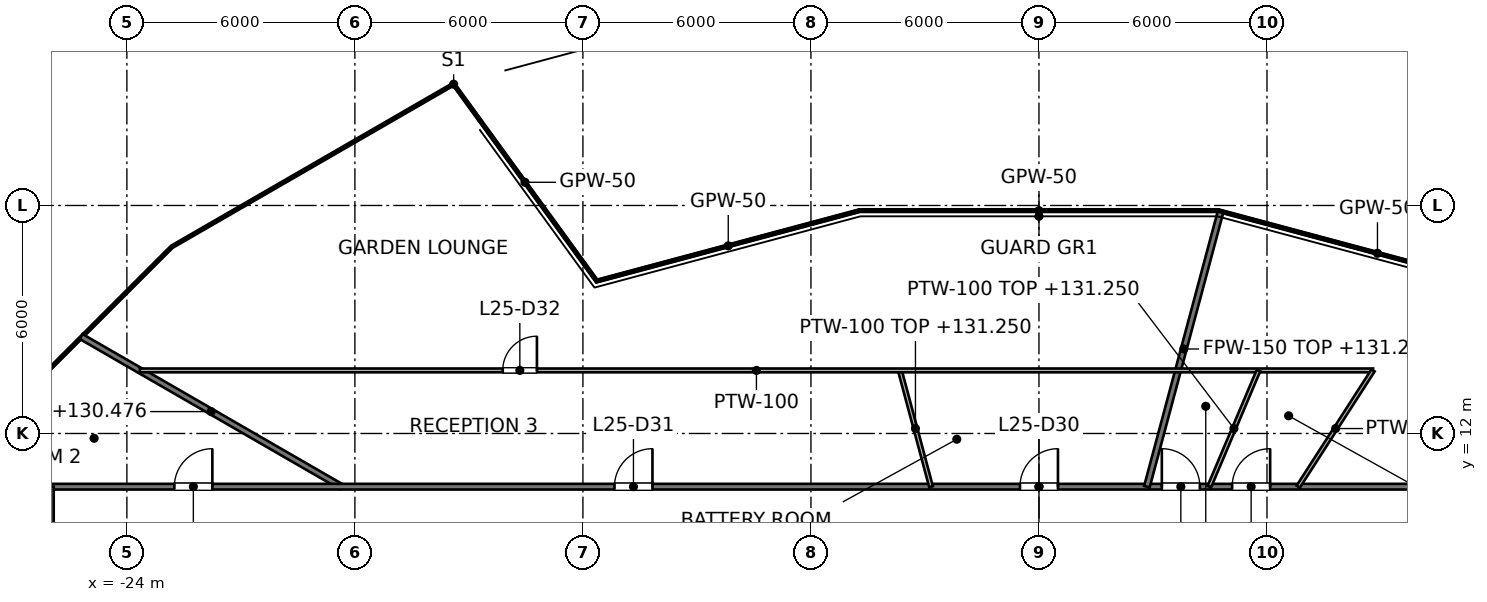
"""IFC4 building model, lengths in metres.
Left out: names, types, materials, properties, quantities, classifications, styles, units other than length and angle.
Written with IfcOpenShell. Run it as: python <this file> out.ifc"""

import sys

from ifc_helpers import new_model, si_unit, direction, frame, frame_2d, origin, place, context, subcontext, project, spatial, rectangle, extrude, element, fill, save


model = new_model("IFC4")
c1 = context("Model", 3, precision=1e-05, world=origin(), true_north=direction((0.0, 1.0)))
c2 = subcontext(c1, "Body", "Model", "MODEL_VIEW")
j1 = project(units=[si_unit("LENGTHUNIT", "METRE"), si_unit("PLANEANGLEUNIT", "RADIAN")], contexts=[c1])
p1 = place(None, origin())
s1 = spatial("IfcSite", under=j1, at=p1, CompositionType="ELEMENT")
p2 = place(p1, origin())
s2 = spatial("IfcBuilding", under=s1, at=p2, CompositionType="ELEMENT")
p3 = place(p2, frame((0.0, 0.0, 127.2)))
s3 = spatial("IfcBuildingStorey", under=s2, at=p3, CompositionType="ELEMENT", Elevation=127.2)
p4 = place(p3, frame((-25.205, 14.552, 0.0), z_axis=(0.0, 0.0, 1.0), x_axis=(0.866027670838, -0.499996073327, 0.0)))
e1 = element("IfcWall", 1, at=p4, inside=s3, PredefinedType="PARTITIONING", context=c2, shape_type="SweptSolid", body=[
    extrude(rectangle(XDim=7.904, YDim=0.15, at=frame_2d((3.952, 0.0))), origin(), (0.0, 0.0, 1.0), 3.276),
])
p5 = place(p3, frame((-26.0, 10.6, 0.0), z_axis=(0.0, 0.0, 1.0), x_axis=(1.0, 0.0, 0.0)))
e2 = element("IfcWall", 2, at=p5, inside=s3, PredefinedType="PARTITIONING", context=c2, shape_type="SweptSolid", body=[
    extrude(rectangle(XDim=52.0, YDim=0.15, at=frame_2d((26.0, 0.0))), origin(), (0.0, 0.0, 1.0), 3.127),
])
p6 = place(p5, frame((41.861, 0.0, 0.0)))
e3 = element("IfcOpeningElement", 3, at=p6, cuts=e2, PredefinedType="OPENING", context=c2, shape_type="SweptSolid", body=[
    extrude(rectangle(XDim=1.2, YDim=2.1, at=frame_2d((0.6, 1.05))), frame((0.0, 0.075, 0.0), z_axis=(0.0, -1.0, 0.0), x_axis=(1.0, 0.0, 0.0)), (0.0, 0.0, 1.0), 0.15),
])
p7 = place(p5, frame((31.083, 0.0, 0.0)))
e4 = element("IfcOpeningElement", 4, at=p7, cuts=e2, PredefinedType="OPENING", context=c2, shape_type="SweptSolid", body=[
    extrude(rectangle(XDim=1.0, YDim=2.1, at=frame_2d((0.5, 1.05))), frame((0.0, 0.075, 0.0), z_axis=(0.0, -1.0, 0.0), x_axis=(1.0, 0.0, 0.0)), (0.0, 0.0, 1.0), 0.15),
])
p8 = place(p5, frame((29.233, 0.0, 0.0)))
e5 = element("IfcOpeningElement", 5, at=p8, cuts=e2, PredefinedType="OPENING", context=c2, shape_type="SweptSolid", body=[
    extrude(rectangle(XDim=1.0, YDim=2.1, at=frame_2d((0.5, 1.05))), frame((0.0, 0.075, 0.0), z_axis=(0.0, -1.0, 0.0), x_axis=(1.0, 0.0, 0.0)), (0.0, 0.0, 1.0), 0.15),
])
p9 = place(p5, frame((25.5, 0.0, 0.0)))
e6 = element("IfcOpeningElement", 6, at=p9, cuts=e2, PredefinedType="OPENING", context=c2, shape_type="SweptSolid", body=[
    extrude(rectangle(XDim=1.0, YDim=2.1, at=frame_2d((0.5, 1.05))), frame((0.0, 0.075, 0.0), z_axis=(0.0, -1.0, 0.0), x_axis=(1.0, 0.0, 0.0)), (0.0, 0.0, 1.0), 0.15),
])
p10 = place(p5, frame((14.83, 0.0, 0.0)))
e7 = element("IfcOpeningElement", 7, at=p10, cuts=e2, PredefinedType="OPENING", context=c2, shape_type="SweptSolid", body=[
    extrude(rectangle(XDim=1.0, YDim=2.1, at=frame_2d((0.5, 1.05))), frame((0.0, 0.075, 0.0), z_axis=(0.0, -1.0, 0.0), x_axis=(1.0, 0.0, 0.0)), (0.0, 0.0, 1.0), 0.15),
])
p11 = place(p5, frame((3.249, 0.0, 0.0)))
e8 = element("IfcOpeningElement", 8, at=p11, cuts=e2, PredefinedType="OPENING", context=c2, shape_type="SweptSolid", body=[
    extrude(rectangle(XDim=1.0, YDim=2.1, at=frame_2d((0.5, 1.05))), frame((0.0, 0.075, 0.0), z_axis=(0.0, -1.0, 0.0), x_axis=(1.0, 0.0, 0.0)), (0.0, 0.0, 1.0), 0.15),
])
p12 = place(p3, frame((2.84, 10.6, 0.0), z_axis=(0.0, 0.0, 1.0), x_axis=(0.258833136442, 0.965922050416, 0.0)))
e9 = element("IfcWall", 9, at=p12, inside=s3, PredefinedType="PARTITIONING", context=c2, shape_type="SweptSolid", body=[
    extrude(rectangle(XDim=7.502, YDim=0.15, at=frame_2d((3.751, 0.0))), origin(), (0.0, 0.0, 1.0), 4.05),
])
p13 = place(p3, frame((-26.0, 7.8, 0.0), z_axis=(0.0, 0.0, 1.0), x_axis=(0.0, 1.0, 0.0)))
e10 = element("IfcWall", 10, at=p13, inside=s3, PredefinedType="PARTITIONING", context=c2, shape_type="SweptSolid", body=[
    extrude(rectangle(XDim=2.8, YDim=0.15, at=frame_2d((1.4, 0.0))), origin(), (0.0, 0.0, 1.0), 3.195),
])
p14 = place(p3, frame((-15.414, 21.21, 0.0), z_axis=(0.0, 0.0, 1.0), x_axis=(0.587866723906, -0.808957795514, 0.0)))
e11 = element("IfcWall", 11, at=p14, inside=s3, PredefinedType="PARTITIONING", context=c2, shape_type="SweptSolid", body=[
    extrude(rectangle(XDim=6.427, YDim=0.05, at=frame_2d((3.213, 0.0))), origin(), (0.0, 0.0, 1.0), 3.127),
])
p15 = place(p3, frame((4.716, 17.865, 0.0), z_axis=(0.0, 0.0, 1.0), x_axis=(0.965920421928, -0.258839213612, 0.0)))
e12 = element("IfcWall", 12, at=p15, inside=s3, PredefinedType="PARTITIONING", context=c2, shape_type="SweptSolid", body=[
    extrude(rectangle(XDim=8.677, YDim=0.05, at=frame_2d((4.339, 0.0))), origin(), (0.0, 0.0, 1.0), 3.127),
])
p16 = place(p3, frame((-4.716, 17.865, 0.0), z_axis=(0.0, 0.0, 1.0), x_axis=(1.0, 0.0, 0.0)))
e13 = element("IfcWall", 13, at=p16, inside=s3, PredefinedType="PARTITIONING", context=c2, shape_type="SweptSolid", body=[
    extrude(rectangle(XDim=9.432, YDim=0.05, at=frame_2d((4.716, 0.0))), origin(), (0.0, 0.0, 1.0), 3.127),
])
p17 = place(p3, frame((-11.636, 16.011, 0.0), z_axis=(0.0, 0.0, 1.0), x_axis=(0.965932232061, 0.258795137252, 0.0)))
e14 = element("IfcWall", 14, at=p17, inside=s3, PredefinedType="PARTITIONING", context=c2, shape_type="SweptSolid", body=[
    extrude(rectangle(XDim=7.164, YDim=0.05, at=frame_2d((3.582, 0.0))), origin(), (0.0, 0.0, 1.0), 3.127),
])
p18 = place(p3, frame((-3.66, 13.66, 0.0), z_axis=(0.0, 0.0, 1.0), x_axis=(0.258804143637, -0.965929819001, 0.0)))
e15 = element("IfcWall", 15, at=p18, inside=s3, PredefinedType="PARTITIONING", context=c2, shape_type="SweptSolid", body=[
    extrude(rectangle(XDim=3.168, YDim=0.1, at=frame_2d((1.584, 0.0))), origin(), (0.0, 0.0, 1.0), 4.05),
])
p19 = place(p3, frame((-23.66, 13.66, 0.0), z_axis=(0.0, 0.0, 1.0), x_axis=(1.0, 0.0, 0.0)))
e16 = element("IfcWall", 16, at=p19, inside=s3, PredefinedType="PARTITIONING", context=c2, shape_type="SweptSolid", body=[
    extrude(rectangle(XDim=32.451, YDim=0.1, at=frame_2d((16.226, 0.0))), origin(), (0.0, 0.0, 1.0), 3.127),
])
p20 = place(p19, frame((9.55, 0.0, 0.0)))
e17 = element("IfcOpeningElement", 17, at=p20, cuts=e16, PredefinedType="OPENING", context=c2, shape_type="SweptSolid", body=[
    extrude(rectangle(XDim=0.9, YDim=2.1, at=frame_2d((0.45, 1.05))), frame((0.0, 0.05, 0.0), z_axis=(0.0, -1.0, 0.0), x_axis=(1.0, 0.0, 0.0)), (0.0, 0.0, 1.0), 0.1),
])
p21 = place(p3, frame((6.822, 10.6, 0.0), z_axis=(0.0, 0.0, 1.0), x_axis=(0.541140741439, 0.840932041222, 0.0)))
e18 = element("IfcWall", 18, at=p21, inside=s3, PredefinedType="PARTITIONING", context=c2, shape_type="SweptSolid", body=[
    extrude(rectangle(XDim=3.639, YDim=0.1, at=frame_2d((1.819, 0.0))), origin(), (0.0, 0.0, 1.0), 4.05),
])
p22 = place(p3, frame((4.483, 10.6, 0.0), z_axis=(0.0, 0.0, 1.0), x_axis=(0.389551289035, 0.921004773718, 0.0)))
e19 = element("IfcWall", 19, at=p22, inside=s3, PredefinedType="PARTITIONING", context=c2, shape_type="SweptSolid", body=[
    extrude(rectangle(XDim=3.322, YDim=0.1, at=frame_2d((1.661, 0.0))), origin(), (0.0, 0.0, 1.0), 4.05),
])
p23 = place(p7, origin())
e20 = element("IfcDoor", 20, at=p23, inside=s3, OperationType="SINGLE_SWING_RIGHT", PredefinedType="DOOR", context=c2, shape_type="SweptSolid", body=[
    extrude(rectangle(XDim=1.0, YDim=2.1, at=frame_2d((0.5, 1.05))), frame((0.0, 0.025, 0.0), z_axis=(0.0, -1.0, 0.0), x_axis=(1.0, 0.0, 0.0)), (0.0, 0.0, 1.0), 0.05),
])
fill(e4, e20)
p24 = place(p8, origin())
e21 = element("IfcDoor", 21, at=p24, inside=s3, OperationType="SINGLE_SWING_LEFT", PredefinedType="DOOR", context=c2, shape_type="SweptSolid", body=[
    extrude(rectangle(XDim=1.0, YDim=2.1, at=frame_2d((0.5, 1.05))), frame((0.0, 0.025, 0.0), z_axis=(0.0, -1.0, 0.0), x_axis=(1.0, 0.0, 0.0)), (0.0, 0.0, 1.0), 0.05),
])
fill(e5, e21)
p25 = place(p9, origin())
e22 = element("IfcDoor", 22, at=p25, inside=s3, OperationType="SINGLE_SWING_RIGHT", PredefinedType="DOOR", context=c2, shape_type="SweptSolid", body=[
    extrude(rectangle(XDim=1.0, YDim=2.1, at=frame_2d((0.5, 1.05))), frame((0.0, 0.025, 0.0), z_axis=(0.0, -1.0, 0.0), x_axis=(1.0, 0.0, 0.0)), (0.0, 0.0, 1.0), 0.05),
])
fill(e6, e22)
p26 = place(p10, origin())
e23 = element("IfcDoor", 23, at=p26, inside=s3, OperationType="SINGLE_SWING_RIGHT", PredefinedType="DOOR", context=c2, shape_type="SweptSolid", body=[
    extrude(rectangle(XDim=1.0, YDim=2.1, at=frame_2d((0.5, 1.05))), frame((0.0, 0.025, 0.0), z_axis=(0.0, -1.0, 0.0), x_axis=(1.0, 0.0, 0.0)), (0.0, 0.0, 1.0), 0.05),
])
fill(e7, e23)
p27 = place(p20, origin())
e24 = element("IfcDoor", 24, at=p27, inside=s3, OperationType="SINGLE_SWING_RIGHT", PredefinedType="DOOR", context=c2, shape_type="SweptSolid", body=[
    extrude(rectangle(XDim=0.9, YDim=2.1, at=frame_2d((0.45, 1.05))), frame((0.0, 0.025, 0.0), z_axis=(0.0, -1.0, 0.0), x_axis=(1.0, 0.0, 0.0)), (0.0, 0.0, 1.0), 0.05),
])
fill(e17, e24)
p28 = place(p11, origin())
e25 = element("IfcDoor", 25, at=p28, inside=s3, OperationType="SINGLE_SWING_RIGHT", PredefinedType="DOOR", context=c2, shape_type="SweptSolid", body=[
    extrude(rectangle(XDim=1.0, YDim=2.1, at=frame_2d((0.5, 1.05))), frame((0.0, 0.025, 0.0), z_axis=(0.0, -1.0, 0.0), x_axis=(1.0, 0.0, 0.0)), (0.0, 0.0, 1.0), 0.05),
])
fill(e8, e25)
save(model, sys.argv[1])
